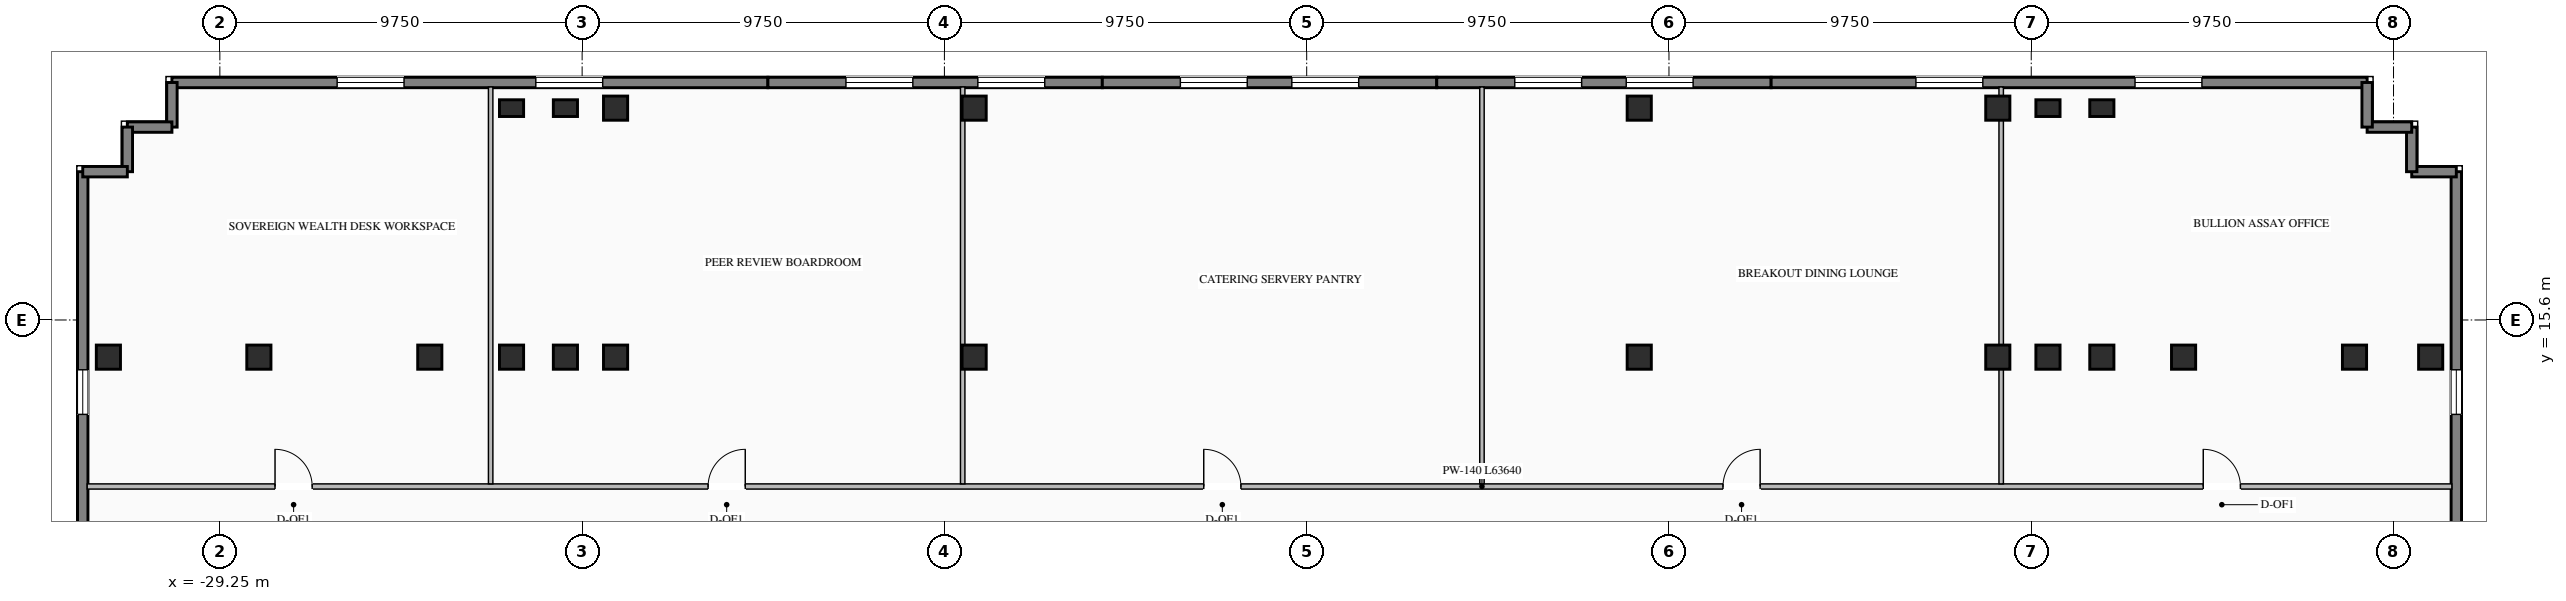
"""IFC4 building model, lengths in metres.
Left out: names, types, materials, properties, quantities, classifications, styles, units other than length and angle.
Written with IfcOpenShell. Run it as: python <this file> out.ifc"""

import sys

from ifc_helpers import new_model, si_unit, direction, frame, frame_2d, origin, origin_2d, place, context, subcontext, project, spatial, rectangle, i_section, extrude, element, fill, save


model = new_model("IFC4")
c1 = context("Model", 3, precision=1e-05, world=origin(), true_north=direction((0.0, 1.0)))
c2 = subcontext(c1, "Body", "Model", "MODEL_VIEW")
j1 = project(units=[si_unit("LENGTHUNIT", "METRE"), si_unit("PLANEANGLEUNIT", "RADIAN")], contexts=[c1])
p1 = place(None, origin())
s1 = spatial("IfcSite", under=j1, at=p1, CompositionType="ELEMENT")
p2 = place(p1, origin())
s2 = spatial("IfcBuilding", under=s1, at=p2, CompositionType="ELEMENT")
p3 = place(p2, frame((0.0, 0.0, 131.2)))
s3 = spatial("IfcBuildingStorey", under=s2, at=p3, CompositionType="ELEMENT", Elevation=131.2)
for number, where, z_axis, x_axis in (
    (1, (-21.4, 14.6, 0.0), (0.0, 0.0, 1.0), (1.0, 0.0, 0.0)),
    (2, (-19.95, 14.6, 0.0), (0.0, 0.0, 1.0), (1.0, 0.0, 0.0)),
    (3, (-18.6, 14.6, 0.0), (0.0, 0.0, 1.0), (1.0, 0.0, 0.0)),
    (4, (-8.95, 14.6, 0.0), (0.0, 0.0, 1.0), (1.0, 0.0, 0.0)),
    (5, (8.95, 14.6, 0.0), (0.0, 0.0, 1.0), (1.0, 0.0, 0.0)),
    (6, (18.6, 14.6, 0.0), (0.0, 0.0, 1.0), (1.0, 0.0, 0.0)),
    (7, (19.95, 14.6, 0.0), (0.0, 0.0, 1.0), (1.0, 0.0, 0.0)),
    (8, (21.4, 14.6, 0.0), (0.0, 0.0, 1.0), (1.0, 0.0, 0.0)),
    (9, (-23.6, 14.6, 0.0), (0.0, 0.0, 1.0), (1.0, 0.0, 0.0)),
    (10, (23.6, 14.6, 0.0), (0.0, 0.0, 1.0), (1.0, 0.0, 0.0)),
    (11, (-28.2, 14.6, 0.0), (0.0, 0.0, 1.0), (1.0, 0.0, 0.0)),
    (12, (28.2, 14.6, 0.0), (0.0, 0.0, 1.0), (1.0, 0.0, 0.0)),
    (13, (-18.6, 21.3, 0.0), (0.0, 0.0, 1.0), (1.0, 0.0, 0.0)),
    (14, (-8.95, 21.3, 0.0), (0.0, 0.0, 1.0), (1.0, 0.0, 0.0)),
    (15, (8.95, 21.3, 0.0), (0.0, 0.0, 1.0), (1.0, 0.0, 0.0)),
    (16, (18.6, 21.3, 0.0), (0.0, 0.0, 1.0), (1.0, 0.0, 0.0)),
    (17, (-32.25, 14.6, 0.0), (0.0, 0.0, 1.0), (1.0, 0.0, 0.0)),
    (18, (30.25, 14.6, 0.0), (0.0, 0.0, 1.0), (1.0, 0.0, 0.0)),
):
    element("IfcColumn", number, at=place(p3, frame(where, z_axis=z_axis, x_axis=x_axis)), inside=s3, PredefinedType="COLUMN", context=c2, shape_type="SweptSolid", body=[
        extrude(i_section(OverallWidth=0.65, OverallDepth=0.65, WebThickness=0.028, FlangeThickness=0.04, at=origin_2d()), origin(), (0.0, 0.0, 1.0), 3.45),
    ])
for number, where, z_axis, x_axis in (
    (19, (-21.4, 21.3, 0.0), (0.0, 0.0, 1.0), (1.0, 0.0, 0.0)),
    (20, (-19.95, 21.3, 0.0), (0.0, 0.0, 1.0), (1.0, 0.0, 0.0)),
    (21, (19.95, 21.3, 0.0), (0.0, 0.0, 1.0), (1.0, 0.0, 0.0)),
    (22, (21.4, 21.3, 0.0), (0.0, 0.0, 1.0), (1.0, 0.0, 0.0)),
):
    element("IfcColumn", number, at=place(p3, frame(where, z_axis=z_axis, x_axis=x_axis)), inside=s3, PredefinedType="PILASTER", context=c2, shape_type="SweptSolid", body=[
        extrude(rectangle(XDim=0.65, YDim=0.45, at=origin_2d()), origin(), (0.0, 0.0, 1.0), 3.45),
    ])
p4 = place(p3, frame((-30.54, 21.99, 0.0), z_axis=(0.0, 0.0, 1.0), x_axis=(1.0, 0.0, 0.0)))
e23 = element("IfcWall", 23, at=p4, inside=s3, PredefinedType="STANDARD", context=c2, shape_type="SweptSolid", body=[
    extrude(rectangle(XDim=16.04, YDim=0.28, at=frame_2d((8.02, 0.0))), origin(), (0.0, 0.0, 1.0), 3.25),
])
p5 = place(p4, frame((4.447, 0.0, 0.76)))
e24 = element("IfcOpeningElement", 24, at=p5, cuts=e23, PredefinedType="OPENING", context=c2, shape_type="SweptSolid", body=[
    extrude(rectangle(XDim=1.8, YDim=1.95, at=frame_2d((0.9, 0.975))), frame((0.0, 0.15, 0.0), z_axis=(0.0, -1.0, 0.0), x_axis=(1.0, 0.0, 0.0)), (0.0, 0.0, 1.0), 0.3),
])
p6 = place(p4, frame((9.793, 0.0, 0.76)))
e25 = element("IfcOpeningElement", 25, at=p6, cuts=e23, PredefinedType="OPENING", context=c2, shape_type="SweptSolid", body=[
    extrude(rectangle(XDim=1.8, YDim=1.95, at=frame_2d((0.9, 0.975))), frame((0.0, 0.15, 0.0), z_axis=(0.0, -1.0, 0.0), x_axis=(1.0, 0.0, 0.0)), (0.0, 0.0, 1.0), 0.3),
])
p7 = place(p3, frame((-14.5, 21.99, 0.0), z_axis=(0.0, 0.0, 1.0), x_axis=(1.0, 0.0, 0.0)))
e26 = element("IfcWall", 26, at=p7, inside=s3, PredefinedType="STANDARD", context=c2, shape_type="SweptSolid", body=[
    extrude(rectangle(XDim=9.0, YDim=0.28, at=frame_2d((4.5, 0.0))), origin(), (0.0, 0.0, 1.0), 3.25),
])
p8 = place(p7, frame((2.1, 0.0, 0.76)))
e27 = element("IfcOpeningElement", 27, at=p8, cuts=e26, PredefinedType="OPENING", context=c2, shape_type="SweptSolid", body=[
    extrude(rectangle(XDim=1.8, YDim=1.95, at=frame_2d((0.9, 0.975))), frame((0.0, 0.15, 0.0), z_axis=(0.0, -1.0, 0.0), x_axis=(1.0, 0.0, 0.0)), (0.0, 0.0, 1.0), 0.3),
])
p9 = place(p7, frame((5.65, 0.0, 0.76)))
e28 = element("IfcOpeningElement", 28, at=p9, cuts=e26, PredefinedType="OPENING", context=c2, shape_type="SweptSolid", body=[
    extrude(rectangle(XDim=1.8, YDim=1.95, at=frame_2d((0.9, 0.975))), frame((0.0, 0.15, 0.0), z_axis=(0.0, -1.0, 0.0), x_axis=(1.0, 0.0, 0.0)), (0.0, 0.0, 1.0), 0.3),
])
p10 = place(p3, frame((-5.5, 21.99, 0.0), z_axis=(0.0, 0.0, 1.0), x_axis=(1.0, 0.0, 0.0)))
e29 = element("IfcWall", 29, at=p10, inside=s3, PredefinedType="STANDARD", context=c2, shape_type="SweptSolid", body=[
    extrude(rectangle(XDim=9.0, YDim=0.28, at=frame_2d((4.5, 0.0))), origin(), (0.0, 0.0, 1.0), 3.25),
])
p11 = place(p10, frame((2.1, 0.0, 0.76)))
e30 = element("IfcOpeningElement", 30, at=p11, cuts=e29, PredefinedType="OPENING", context=c2, shape_type="SweptSolid", body=[
    extrude(rectangle(XDim=1.8, YDim=1.95, at=frame_2d((0.9, 0.975))), frame((0.0, 0.15, 0.0), z_axis=(0.0, -1.0, 0.0), x_axis=(1.0, 0.0, 0.0)), (0.0, 0.0, 1.0), 0.3),
])
p12 = place(p10, frame((5.1, 0.0, 0.76)))
e31 = element("IfcOpeningElement", 31, at=p12, cuts=e29, PredefinedType="OPENING", context=c2, shape_type="SweptSolid", body=[
    extrude(rectangle(XDim=1.8, YDim=1.95, at=frame_2d((0.9, 0.975))), frame((0.0, 0.15, 0.0), z_axis=(0.0, -1.0, 0.0), x_axis=(1.0, 0.0, 0.0)), (0.0, 0.0, 1.0), 0.3),
])
p13 = place(p3, frame((3.5, 21.99, 0.0), z_axis=(0.0, 0.0, 1.0), x_axis=(1.0, 0.0, 0.0)))
e32 = element("IfcWall", 32, at=p13, inside=s3, PredefinedType="STANDARD", context=c2, shape_type="SweptSolid", body=[
    extrude(rectangle(XDim=9.0, YDim=0.28, at=frame_2d((4.5, 0.0))), origin(), (0.0, 0.0, 1.0), 3.25),
])
p14 = place(p13, frame((2.1, 0.0, 0.76)))
e33 = element("IfcOpeningElement", 33, at=p14, cuts=e32, PredefinedType="OPENING", context=c2, shape_type="SweptSolid", body=[
    extrude(rectangle(XDim=1.8, YDim=1.95, at=frame_2d((0.9, 0.975))), frame((0.0, 0.15, 0.0), z_axis=(0.0, -1.0, 0.0), x_axis=(1.0, 0.0, 0.0)), (0.0, 0.0, 1.0), 0.3),
])
p15 = place(p13, frame((5.1, 0.0, 0.76)))
e34 = element("IfcOpeningElement", 34, at=p15, cuts=e32, PredefinedType="OPENING", context=c2, shape_type="SweptSolid", body=[
    extrude(rectangle(XDim=1.8, YDim=1.95, at=frame_2d((0.9, 0.975))), frame((0.0, 0.15, 0.0), z_axis=(0.0, -1.0, 0.0), x_axis=(1.0, 0.0, 0.0)), (0.0, 0.0, 1.0), 0.3),
])
p16 = place(p3, frame((12.5, 21.99, 0.0), z_axis=(0.0, 0.0, 1.0), x_axis=(1.0, 0.0, 0.0)))
e35 = element("IfcWall", 35, at=p16, inside=s3, PredefinedType="STANDARD", context=c2, shape_type="SweptSolid", body=[
    extrude(rectangle(XDim=16.04, YDim=0.28, at=frame_2d((8.02, 0.0))), origin(), (0.0, 0.0, 1.0), 3.25),
])
p17 = place(p16, frame((3.897, 0.0, 0.76)))
e36 = element("IfcOpeningElement", 36, at=p17, cuts=e35, PredefinedType="OPENING", context=c2, shape_type="SweptSolid", body=[
    extrude(rectangle(XDim=1.8, YDim=1.95, at=frame_2d((0.9, 0.975))), frame((0.0, 0.15, 0.0), z_axis=(0.0, -1.0, 0.0), x_axis=(1.0, 0.0, 0.0)), (0.0, 0.0, 1.0), 0.3),
])
p18 = place(p16, frame((9.793, 0.0, 0.76)))
e37 = element("IfcOpeningElement", 37, at=p18, cuts=e35, PredefinedType="OPENING", context=c2, shape_type="SweptSolid", body=[
    extrude(rectangle(XDim=1.8, YDim=1.95, at=frame_2d((0.9, 0.975))), frame((0.0, 0.15, 0.0), z_axis=(0.0, -1.0, 0.0), x_axis=(1.0, 0.0, 0.0)), (0.0, 0.0, 1.0), 0.3),
])
p19 = place(p3, frame((-32.94, 1.8, 0.0), z_axis=(0.0, 0.0, 1.0), x_axis=(0.0, 1.0, 0.0)))
e38 = element("IfcWall", 38, at=p19, inside=s3, PredefinedType="STANDARD", context=c2, shape_type="SweptSolid", body=[
    extrude(rectangle(XDim=17.79, YDim=0.28, at=frame_2d((8.895, 0.0))), origin(), (0.0, 0.0, 1.0), 3.25),
])
p20 = place(p19, frame((5.33, 0.0, 0.76)))
e39 = element("IfcOpeningElement", 39, at=p20, cuts=e38, PredefinedType="OPENING", context=c2, shape_type="SweptSolid", body=[
    extrude(rectangle(XDim=1.2, YDim=1.95, at=frame_2d((0.6, 0.975))), frame((0.0, 0.15, 0.0), z_axis=(0.0, -1.0, 0.0), x_axis=(1.0, 0.0, 0.0)), (0.0, 0.0, 1.0), 0.3),
])
p21 = place(p19, frame((11.26, 0.0, 0.76)))
e40 = element("IfcOpeningElement", 40, at=p21, cuts=e38, PredefinedType="OPENING", context=c2, shape_type="SweptSolid", body=[
    extrude(rectangle(XDim=1.2, YDim=1.95, at=frame_2d((0.6, 0.975))), frame((0.0, 0.15, 0.0), z_axis=(0.0, -1.0, 0.0), x_axis=(1.0, 0.0, 0.0)), (0.0, 0.0, 1.0), 0.3),
])
p22 = place(p3, frame((30.94, 19.59, 0.0), z_axis=(0.0, 0.0, 1.0), x_axis=(0.0, -1.0, 0.0)))
e41 = element("IfcWall", 41, at=p22, inside=s3, PredefinedType="STANDARD", context=c2, shape_type="SweptSolid", body=[
    extrude(rectangle(XDim=17.79, YDim=0.28, at=frame_2d((8.895, 0.0))), origin(), (0.0, 0.0, 1.0), 3.25),
])
p23 = place(p22, frame((5.33, 0.0, 0.76)))
e42 = element("IfcOpeningElement", 42, at=p23, cuts=e41, PredefinedType="OPENING", context=c2, shape_type="SweptSolid", body=[
    extrude(rectangle(XDim=1.2, YDim=1.95, at=frame_2d((0.6, 0.975))), frame((0.0, 0.15, 0.0), z_axis=(0.0, -1.0, 0.0), x_axis=(1.0, 0.0, 0.0)), (0.0, 0.0, 1.0), 0.3),
])
p24 = place(p22, frame((11.26, 0.0, 0.76)))
e43 = element("IfcOpeningElement", 43, at=p24, cuts=e41, PredefinedType="OPENING", context=c2, shape_type="SweptSolid", body=[
    extrude(rectangle(XDim=1.2, YDim=1.95, at=frame_2d((0.6, 0.975))), frame((0.0, 0.15, 0.0), z_axis=(0.0, -1.0, 0.0), x_axis=(1.0, 0.0, 0.0)), (0.0, 0.0, 1.0), 0.3),
])
for number, where, z_axis, x_axis in (
    (44, (30.94, 19.59, 0.0), (0.0, 0.0, 1.0), (-1.0, 0.0, 0.0)),
    (45, (29.74, 19.59, 0.0), (0.0, 0.0, 1.0), (0.0, 1.0, 0.0)),
    (46, (29.74, 20.79, 0.0), (0.0, 0.0, 1.0), (-1.0, 0.0, 0.0)),
    (47, (28.54, 20.79, 0.0), (0.0, 0.0, 1.0), (0.0, 1.0, 0.0)),
    (48, (-30.54, 21.99, 0.0), (0.0, 0.0, 1.0), (0.0, -1.0, 0.0)),
    (49, (-30.54, 20.79, 0.0), (0.0, 0.0, 1.0), (-1.0, 0.0, 0.0)),
    (50, (-31.74, 20.79, 0.0), (0.0, 0.0, 1.0), (0.0, -1.0, 0.0)),
    (51, (-31.74, 19.59, 0.0), (0.0, 0.0, 1.0), (-1.0, 0.0, 0.0)),
):
    element("IfcWall", number, at=place(p3, frame(where, z_axis=z_axis, x_axis=x_axis)), inside=s3, PredefinedType="STANDARD", context=c2, shape_type="SweptSolid", body=[
        extrude(rectangle(XDim=1.2, YDim=0.28, at=frame_2d((0.6, 0.0))), origin(), (0.0, 0.0, 1.0), 3.25),
    ])
p25 = place(p3, frame((-32.82, 11.12, 0.0), z_axis=(0.0, 0.0, 1.0), x_axis=(1.0, 0.0, 0.0)))
e52 = element("IfcWall", 52, at=p25, inside=s3, PredefinedType="STANDARD", context=c2, shape_type="SweptSolid", body=[
    extrude(rectangle(XDim=63.64, YDim=0.14, at=frame_2d((31.82, 0.0))), origin(), (0.0, 0.0, 1.0), 3.25),
])
p26 = place(p25, frame((5.055, 0.0, 0.0)))
e53 = element("IfcOpeningElement", 53, at=p26, cuts=e52, PredefinedType="OPENING", context=c2, shape_type="SweptSolid", body=[
    extrude(rectangle(XDim=1.0, YDim=2.08, at=frame_2d((0.5, 1.04))), frame((0.0, 0.08, 0.0), z_axis=(0.0, -1.0, 0.0), x_axis=(1.0, 0.0, 0.0)), (0.0, 0.0, 1.0), 0.16),
])
p27 = place(p25, frame((16.71, 0.0, 0.0)))
e54 = element("IfcOpeningElement", 54, at=p27, cuts=e52, PredefinedType="OPENING", context=c2, shape_type="SweptSolid", body=[
    extrude(rectangle(XDim=1.0, YDim=2.08, at=frame_2d((0.5, 1.04))), frame((0.0, 0.08, 0.0), z_axis=(0.0, -1.0, 0.0), x_axis=(1.0, 0.0, 0.0)), (0.0, 0.0, 1.0), 0.16),
])
p28 = place(p25, frame((30.05, 0.0, 0.0)))
e55 = element("IfcOpeningElement", 55, at=p28, cuts=e52, PredefinedType="OPENING", context=c2, shape_type="SweptSolid", body=[
    extrude(rectangle(XDim=1.0, YDim=2.08, at=frame_2d((0.5, 1.04))), frame((0.0, 0.08, 0.0), z_axis=(0.0, -1.0, 0.0), x_axis=(1.0, 0.0, 0.0)), (0.0, 0.0, 1.0), 0.16),
])
p29 = place(p25, frame((44.024, 0.0, 0.0)))
e56 = element("IfcOpeningElement", 56, at=p29, cuts=e52, PredefinedType="OPENING", context=c2, shape_type="SweptSolid", body=[
    extrude(rectangle(XDim=1.0, YDim=2.08, at=frame_2d((0.5, 1.04))), frame((0.0, 0.08, 0.0), z_axis=(0.0, -1.0, 0.0), x_axis=(1.0, 0.0, 0.0)), (0.0, 0.0, 1.0), 0.16),
])
p30 = place(p25, frame((56.949, 0.0, 0.0)))
e57 = element("IfcOpeningElement", 57, at=p30, cuts=e52, PredefinedType="OPENING", context=c2, shape_type="SweptSolid", body=[
    extrude(rectangle(XDim=1.0, YDim=2.08, at=frame_2d((0.5, 1.04))), frame((0.0, 0.08, 0.0), z_axis=(0.0, -1.0, 0.0), x_axis=(1.0, 0.0, 0.0)), (0.0, 0.0, 1.0), 0.16),
])
for number, where, z_axis, x_axis in (
    (58, (-21.962, 11.19, 0.0), (0.0, 0.0, 1.0), (0.0, 1.0, 0.0)),
    (59, (-9.258, 11.19, 0.0), (0.0, 0.0, 1.0), (0.0, 1.0, 0.0)),
    (60, (4.717, 11.19, 0.0), (0.0, 0.0, 1.0), (0.0, 1.0, 0.0)),
):
    element("IfcWall", number, at=place(p3, frame(where, z_axis=z_axis, x_axis=x_axis)), inside=s3, PredefinedType="STANDARD", context=c2, shape_type="SweptSolid", body=[
        extrude(rectangle(XDim=10.68, YDim=0.12, at=frame_2d((5.34, 0.0))), origin(), (0.0, 0.0, 1.0), 3.25),
    ])
p31 = place(p3, frame((18.691, 11.19, 0.0), z_axis=(0.0, 0.0, 1.0), x_axis=(0.0, 1.0, 0.0)))
e61 = element("IfcWall", 61, at=p31, inside=s3, PredefinedType="STANDARD", context=c2, shape_type="SweptSolid", body=[
    extrude(rectangle(XDim=10.68, YDim=0.12, at=frame_2d((5.34, 0.0))), origin(), (0.0, 0.0, 1.0), 2.645),
])
p32 = place(p5, origin())
e62 = element("IfcWindow", 62, at=p32, inside=s3, PartitioningType="SINGLE_PANEL", PredefinedType="WINDOW", context=c2, shape_type="SweptSolid", body=[
    extrude(rectangle(XDim=1.8, YDim=1.95, at=frame_2d((0.9, 0.975))), frame((0.0, 0.03, 0.0), z_axis=(0.0, -1.0, 0.0), x_axis=(1.0, 0.0, 0.0)), (0.0, 0.0, 1.0), 0.06),
])
fill(e24, e62)
p33 = place(p6, origin())
e63 = element("IfcWindow", 63, at=p33, inside=s3, PartitioningType="SINGLE_PANEL", PredefinedType="WINDOW", context=c2, shape_type="SweptSolid", body=[
    extrude(rectangle(XDim=1.8, YDim=1.95, at=frame_2d((0.9, 0.975))), frame((0.0, 0.03, 0.0), z_axis=(0.0, -1.0, 0.0), x_axis=(1.0, 0.0, 0.0)), (0.0, 0.0, 1.0), 0.06),
])
fill(e25, e63)
p34 = place(p8, origin())
e64 = element("IfcWindow", 64, at=p34, inside=s3, PartitioningType="SINGLE_PANEL", PredefinedType="WINDOW", context=c2, shape_type="SweptSolid", body=[
    extrude(rectangle(XDim=1.8, YDim=1.95, at=frame_2d((0.9, 0.975))), frame((0.0, 0.03, 0.0), z_axis=(0.0, -1.0, 0.0), x_axis=(1.0, 0.0, 0.0)), (0.0, 0.0, 1.0), 0.06),
])
fill(e27, e64)
p35 = place(p9, origin())
e65 = element("IfcWindow", 65, at=p35, inside=s3, PartitioningType="SINGLE_PANEL", PredefinedType="WINDOW", context=c2, shape_type="SweptSolid", body=[
    extrude(rectangle(XDim=1.8, YDim=1.95, at=frame_2d((0.9, 0.975))), frame((0.0, 0.03, 0.0), z_axis=(0.0, -1.0, 0.0), x_axis=(1.0, 0.0, 0.0)), (0.0, 0.0, 1.0), 0.06),
])
fill(e28, e65)
p36 = place(p11, origin())
e66 = element("IfcWindow", 66, at=p36, inside=s3, PartitioningType="SINGLE_PANEL", PredefinedType="WINDOW", context=c2, shape_type="SweptSolid", body=[
    extrude(rectangle(XDim=1.8, YDim=1.95, at=frame_2d((0.9, 0.975))), frame((0.0, 0.03, 0.0), z_axis=(0.0, -1.0, 0.0), x_axis=(1.0, 0.0, 0.0)), (0.0, 0.0, 1.0), 0.06),
])
fill(e30, e66)
p37 = place(p12, origin())
e67 = element("IfcWindow", 67, at=p37, inside=s3, PartitioningType="SINGLE_PANEL", PredefinedType="WINDOW", context=c2, shape_type="SweptSolid", body=[
    extrude(rectangle(XDim=1.8, YDim=1.95, at=frame_2d((0.9, 0.975))), frame((0.0, 0.03, 0.0), z_axis=(0.0, -1.0, 0.0), x_axis=(1.0, 0.0, 0.0)), (0.0, 0.0, 1.0), 0.06),
])
fill(e31, e67)
p38 = place(p14, origin())
e68 = element("IfcWindow", 68, at=p38, inside=s3, PartitioningType="SINGLE_PANEL", PredefinedType="WINDOW", context=c2, shape_type="SweptSolid", body=[
    extrude(rectangle(XDim=1.8, YDim=1.95, at=frame_2d((0.9, 0.975))), frame((0.0, 0.03, 0.0), z_axis=(0.0, -1.0, 0.0), x_axis=(1.0, 0.0, 0.0)), (0.0, 0.0, 1.0), 0.06),
])
fill(e33, e68)
p39 = place(p15, origin())
e69 = element("IfcWindow", 69, at=p39, inside=s3, PartitioningType="SINGLE_PANEL", PredefinedType="WINDOW", context=c2, shape_type="SweptSolid", body=[
    extrude(rectangle(XDim=1.8, YDim=1.95, at=frame_2d((0.9, 0.975))), frame((0.0, 0.03, 0.0), z_axis=(0.0, -1.0, 0.0), x_axis=(1.0, 0.0, 0.0)), (0.0, 0.0, 1.0), 0.06),
])
fill(e34, e69)
p40 = place(p17, origin())
e70 = element("IfcWindow", 70, at=p40, inside=s3, PartitioningType="SINGLE_PANEL", PredefinedType="WINDOW", context=c2, shape_type="SweptSolid", body=[
    extrude(rectangle(XDim=1.8, YDim=1.95, at=frame_2d((0.9, 0.975))), frame((0.0, 0.03, 0.0), z_axis=(0.0, -1.0, 0.0), x_axis=(1.0, 0.0, 0.0)), (0.0, 0.0, 1.0), 0.06),
])
fill(e36, e70)
p41 = place(p18, origin())
e71 = element("IfcWindow", 71, at=p41, inside=s3, PartitioningType="SINGLE_PANEL", PredefinedType="WINDOW", context=c2, shape_type="SweptSolid", body=[
    extrude(rectangle(XDim=1.8, YDim=1.95, at=frame_2d((0.9, 0.975))), frame((0.0, 0.03, 0.0), z_axis=(0.0, -1.0, 0.0), x_axis=(1.0, 0.0, 0.0)), (0.0, 0.0, 1.0), 0.06),
])
fill(e37, e71)
p42 = place(p21, origin())
e72 = element("IfcWindow", 72, at=p42, inside=s3, PartitioningType="SINGLE_PANEL", PredefinedType="WINDOW", context=c2, shape_type="SweptSolid", body=[
    extrude(rectangle(XDim=1.2, YDim=1.95, at=frame_2d((0.6, 0.975))), frame((0.0, 0.03, 0.0), z_axis=(0.0, -1.0, 0.0), x_axis=(1.0, 0.0, 0.0)), (0.0, 0.0, 1.0), 0.06),
])
fill(e40, e72)
p43 = place(p23, origin())
e73 = element("IfcWindow", 73, at=p43, inside=s3, PartitioningType="SINGLE_PANEL", PredefinedType="WINDOW", context=c2, shape_type="SweptSolid", body=[
    extrude(rectangle(XDim=1.2, YDim=1.95, at=frame_2d((0.6, 0.975))), frame((0.0, 0.03, 0.0), z_axis=(0.0, -1.0, 0.0), x_axis=(1.0, 0.0, 0.0)), (0.0, 0.0, 1.0), 0.06),
])
fill(e42, e73)
p44 = place(p26, origin())
e74 = element("IfcDoor", 74, at=p44, inside=s3, OperationType="SINGLE_SWING_LEFT", PredefinedType="DOOR", context=c2, shape_type="SweptSolid", body=[
    extrude(rectangle(XDim=1.0, YDim=2.08, at=frame_2d((0.5, 1.04))), frame((0.0, 0.025, 0.0), z_axis=(0.0, -1.0, 0.0), x_axis=(1.0, 0.0, 0.0)), (0.0, 0.0, 1.0), 0.05),
])
fill(e53, e74)
p45 = place(p27, origin())
e75 = element("IfcDoor", 75, at=p45, inside=s3, OperationType="SINGLE_SWING_RIGHT", PredefinedType="DOOR", context=c2, shape_type="SweptSolid", body=[
    extrude(rectangle(XDim=1.0, YDim=2.08, at=frame_2d((0.5, 1.04))), frame((0.0, 0.025, 0.0), z_axis=(0.0, -1.0, 0.0), x_axis=(1.0, 0.0, 0.0)), (0.0, 0.0, 1.0), 0.05),
])
fill(e54, e75)
p46 = place(p28, origin())
e76 = element("IfcDoor", 76, at=p46, inside=s3, OperationType="SINGLE_SWING_LEFT", PredefinedType="DOOR", context=c2, shape_type="SweptSolid", body=[
    extrude(rectangle(XDim=1.0, YDim=2.08, at=frame_2d((0.5, 1.04))), frame((0.0, 0.025, 0.0), z_axis=(0.0, -1.0, 0.0), x_axis=(1.0, 0.0, 0.0)), (0.0, 0.0, 1.0), 0.05),
])
fill(e55, e76)
p47 = place(p29, origin())
e77 = element("IfcDoor", 77, at=p47, inside=s3, OperationType="SINGLE_SWING_RIGHT", PredefinedType="DOOR", context=c2, shape_type="SweptSolid", body=[
    extrude(rectangle(XDim=1.0, YDim=2.08, at=frame_2d((0.5, 1.04))), frame((0.0, 0.025, 0.0), z_axis=(0.0, -1.0, 0.0), x_axis=(1.0, 0.0, 0.0)), (0.0, 0.0, 1.0), 0.05),
])
fill(e56, e77)
p48 = place(p30, origin())
e78 = element("IfcDoor", 78, at=p48, inside=s3, OperationType="SINGLE_SWING_LEFT", PredefinedType="DOOR", context=c2, shape_type="SweptSolid", body=[
    extrude(rectangle(XDim=1.0, YDim=2.08, at=frame_2d((0.5, 1.04))), frame((0.0, 0.025, 0.0), z_axis=(0.0, -1.0, 0.0), x_axis=(1.0, 0.0, 0.0)), (0.0, 0.0, 1.0), 0.05),
])
fill(e57, e78)
save(model, sys.argv[1])
